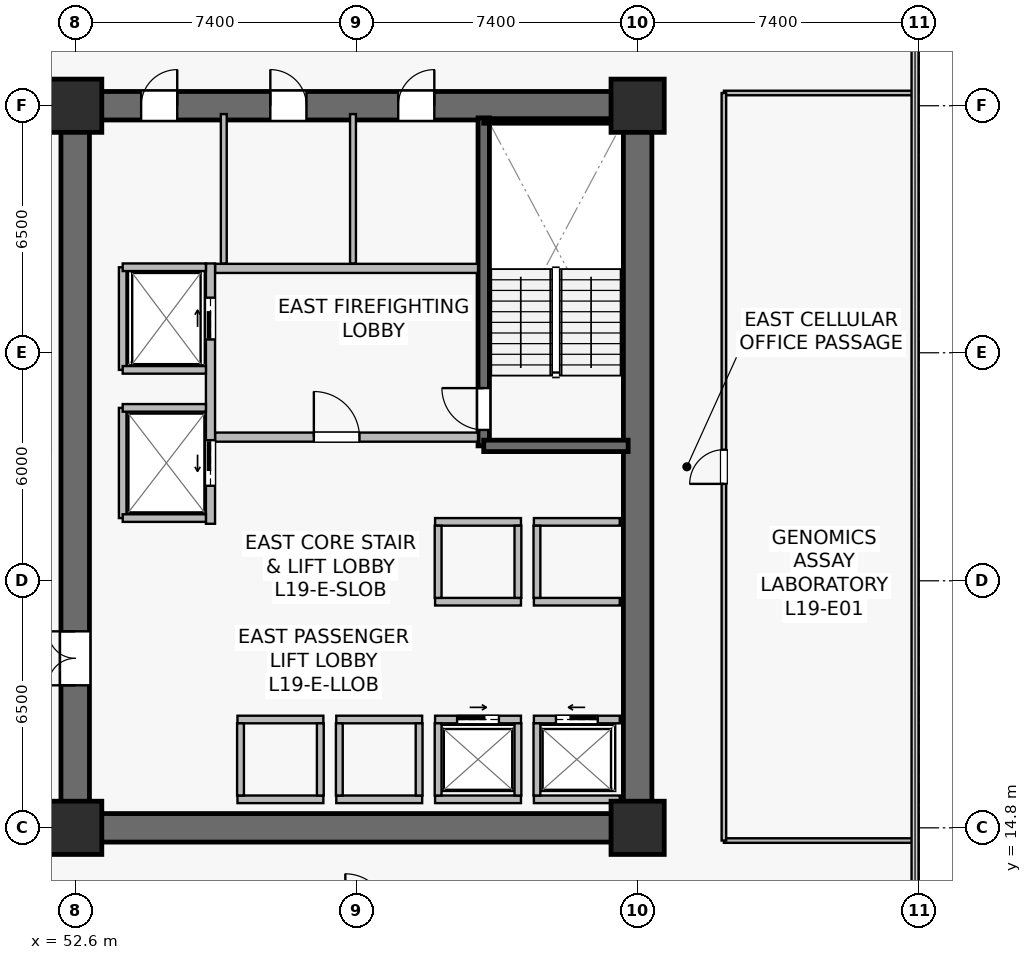
"""IFC4 building model, lengths in metres.
Left out: names, types, materials, properties, quantities, classifications, styles, units other than length and angle.
Written with IfcOpenShell. Run it as: python <this file> out.ifc"""

import sys

from ifc_helpers import new_model, si_unit, direction, frame, frame_2d, origin, origin_2d, place, context, subcontext, project, spatial, rectangle, extrude, source, transform, mapped, element, fill, save


model = new_model("IFC4")
c1 = context("Model", 3, precision=1e-05, world=origin(), true_north=direction((0.0, 1.0)))
c2 = subcontext(c1, "Body", "Model", "MODEL_VIEW")
j1 = project(units=[si_unit("LENGTHUNIT", "METRE"), si_unit("PLANEANGLEUNIT", "RADIAN")], contexts=[c1])
p1 = place(None, origin())
s1 = spatial("IfcSite", under=j1, at=p1, CompositionType="ELEMENT")
p2 = place(p1, origin())
s2 = spatial("IfcBuilding", under=s1, at=p2, CompositionType="ELEMENT")
p3 = place(p2, frame((0.0, 0.0, 78.5)))
s3 = spatial("IfcBuildingStorey", under=s2, at=p3, CompositionType="ELEMENT", Elevation=78.5)
p4 = place(p3, frame((52.225, 14.8, 0.0), z_axis=(0.0, 0.0, 1.0), x_axis=(1.0, 0.0, 0.0)))
e1 = element("IfcWall", 1, at=p4, inside=s3, PredefinedType="SHEAR", context=c2, shape_type="SweptSolid", body=[
    extrude(rectangle(XDim=15.55, YDim=0.75, at=frame_2d((7.775, 0.0))), origin(), (0.0, 0.0, 1.0), 3.78),
])
p5 = place(p3, frame((52.225, 33.8, 0.0), z_axis=(0.0, 0.0, 1.0), x_axis=(1.0, 0.0, 0.0)))
e2 = element("IfcWall", 2, at=p5, inside=s3, PredefinedType="SHEAR", context=c2, shape_type="SweptSolid", body=[
    extrude(rectangle(XDim=15.55, YDim=0.75, at=frame_2d((7.775, 0.0))), origin(), (0.0, 0.0, 1.0), 3.78),
])
p6 = place(p5, frame((8.875, 0.0, 0.0)))
e3 = element("IfcOpeningElement", 3, at=p6, cuts=e2, PredefinedType="OPENING", context=c2, shape_type="SweptSolid", body=[
    extrude(rectangle(XDim=0.95, YDim=2.15, at=frame_2d((0.475, 1.075))), frame((0.0, 0.385, 0.0), z_axis=(0.0, -1.0, 0.0), x_axis=(1.0, 0.0, 0.0)), (0.0, 0.0, 1.0), 0.77),
])
p7 = place(p5, frame((5.51, 0.0, 0.0)))
e4 = element("IfcOpeningElement", 4, at=p7, cuts=e2, PredefinedType="OPENING", context=c2, shape_type="SweptSolid", body=[
    extrude(rectangle(XDim=0.95, YDim=2.15, at=frame_2d((0.475, 1.075))), frame((0.0, 0.385, 0.0), z_axis=(0.0, -1.0, 0.0), x_axis=(1.0, 0.0, 0.0)), (0.0, 0.0, 1.0), 0.77),
])
p8 = place(p5, frame((2.11, 0.0, 0.0)))
e5 = element("IfcOpeningElement", 5, at=p8, cuts=e2, PredefinedType="OPENING", context=c2, shape_type="SweptSolid", body=[
    extrude(rectangle(XDim=0.95, YDim=2.15, at=frame_2d((0.475, 1.075))), frame((0.0, 0.385, 0.0), z_axis=(0.0, -1.0, 0.0), x_axis=(1.0, 0.0, 0.0)), (0.0, 0.0, 1.0), 0.77),
])
p9 = place(p3, frame((52.6, 15.175, 0.0), z_axis=(0.0, 0.0, 1.0), x_axis=(0.0, 1.0, 0.0)))
e6 = element("IfcWall", 6, at=p9, inside=s3, PredefinedType="SHEAR", context=c2, shape_type="SweptSolid", body=[
    extrude(rectangle(XDim=18.25, YDim=0.75, at=frame_2d((9.125, 0.0))), origin(), (0.0, 0.0, 1.0), 3.78),
])
p10 = place(p9, frame((3.375, 0.0, 0.0)))
e7 = element("IfcOpeningElement", 7, at=p10, cuts=e6, PredefinedType="OPENING", context=c2, shape_type="SweptSolid", body=[
    extrude(rectangle(XDim=1.42, YDim=2.2, at=frame_2d((0.71, 1.1))), frame((0.0, 0.385, 0.0), z_axis=(0.0, -1.0, 0.0), x_axis=(1.0, 0.0, 0.0)), (0.0, 0.0, 1.0), 0.77),
])
p11 = place(p3, frame((67.4, 15.175, 0.0), z_axis=(0.0, 0.0, 1.0), x_axis=(0.0, 1.0, 0.0)))
e8 = element("IfcWall", 8, at=p11, inside=s3, PredefinedType="SHEAR", context=c2, shape_type="SweptSolid", body=[
    extrude(rectangle(XDim=18.25, YDim=0.75, at=frame_2d((9.125, 0.0))), origin(), (0.0, 0.0, 1.0), 3.78),
])
p12 = place(p3, frame((63.35, 24.85, 0.0), z_axis=(0.0, 0.0, 1.0), x_axis=(0.0, 1.0, 0.0)))
e9 = element("IfcWall", 9, at=p12, inside=s3, PredefinedType="SHEAR", context=c2, shape_type="SweptSolid", body=[
    extrude(rectangle(XDim=8.63, YDim=0.3, at=frame_2d((4.315, 0.0))), origin(), (0.0, 0.0, 1.0), 3.78),
])
p13 = place(p12, frame((0.42, 0.0, 0.0)))
e10 = element("IfcOpeningElement", 10, at=p13, cuts=e9, PredefinedType="OPENING", context=c2, shape_type="SweptSolid", body=[
    extrude(rectangle(XDim=1.1, YDim=2.15, at=frame_2d((0.55, 1.075))), frame((0.0, 0.16, 0.0), z_axis=(0.0, -1.0, 0.0), x_axis=(1.0, 0.0, 0.0)), (0.0, 0.0, 1.0), 0.32),
])
p14 = place(p3, frame((63.35, 24.85, 0.0), z_axis=(0.0, 0.0, 1.0), x_axis=(1.0, 0.0, 0.0)))
e11 = element("IfcWall", 11, at=p14, inside=s3, PredefinedType="SHEAR", context=c2, shape_type="SweptSolid", body=[
    extrude(rectangle(XDim=3.8, YDim=0.3, at=frame_2d((1.9, 0.0))), origin(), (0.0, 0.0, 1.0), 3.78),
])
p15 = place(p3, frame((63.35, 33.4, 0.0), z_axis=(0.0, 0.0, 1.0), x_axis=(1.0, 0.0, 0.0)))
e12 = element("IfcWall", 12, at=p15, inside=s3, PredefinedType="SOLIDWALL", context=c2, shape_type="SweptSolid", body=[
    extrude(rectangle(XDim=3.72, YDim=0.12, at=frame_2d((1.86, 0.0))), origin(), (0.0, 0.0, 1.0), 3.78),
])
m1 = source(origin(), c2, "Body", "SweptSolid", [
    extrude(rectangle(XDim=1.4, YDim=1.4, at=origin_2d()), origin(), (0.0, 0.0, 1.0), 4.1),
])
for number, where, z_axis, x_axis in (
    (13, (52.6, 14.8, 0.0), (0.0, 0.0, 1.0), (1.0, 0.0, 0.0)),
    (14, (67.4, 14.8, 0.0), (0.0, 0.0, 1.0), (1.0, 0.0, 0.0)),
    (15, (52.6, 33.8, 0.0), (0.0, 0.0, 1.0), (1.0, 0.0, 0.0)),
    (16, (67.4, 33.8, 0.0), (0.0, 0.0, 1.0), (1.0, 0.0, 0.0)),
):
    element("IfcColumn", number, at=place(p3, frame(where, z_axis=z_axis, x_axis=x_axis)), inside=s3, PredefinedType="COLUMN", context=c2, shape_type="MappedRepresentation", body=[
        mapped(m1, transform((0.0, 0.0, 0.0), scale=1.0)),
    ])
p16 = place(p3, frame((56.28, 25.08, 0.0), z_axis=(0.0, 0.0, 1.0), x_axis=(1.0, 0.0, 0.0)))
e17 = element("IfcWall", 17, at=p16, inside=s3, PredefinedType="SOLIDWALL", context=c2, shape_type="SweptSolid", body=[
    extrude(rectangle(XDim=6.92, YDim=0.24, at=frame_2d((3.46, 0.0))), origin(), (0.0, 0.0, 1.0), 3.115),
])
p17 = place(p16, frame((2.6, 0.0, 0.0)))
e18 = element("IfcOpeningElement", 18, at=p17, cuts=e17, PredefinedType="OPENING", context=c2, shape_type="SweptSolid", body=[
    extrude(rectangle(XDim=1.2, YDim=2.16, at=frame_2d((0.6, 1.08))), frame((0.0, 0.13, 0.0), z_axis=(0.0, -1.0, 0.0), x_axis=(1.0, 0.0, 0.0)), (0.0, 0.0, 1.0), 0.26),
])
p18 = place(p3, frame((56.28, 29.52, 0.0), z_axis=(0.0, 0.0, 1.0), x_axis=(1.0, 0.0, 0.0)))
e19 = element("IfcWall", 19, at=p18, inside=s3, PredefinedType="SOLIDWALL", context=c2, shape_type="SweptSolid", body=[
    extrude(rectangle(XDim=6.92, YDim=0.24, at=frame_2d((3.46, 0.0))), origin(), (0.0, 0.0, 1.0), 3.115),
])
p19 = place(p3, frame((56.16, 22.8, 0.0), z_axis=(0.0, 0.0, 1.0), x_axis=(0.0, 1.0, 0.0)))
e20 = element("IfcWall", 20, at=p19, inside=s3, PredefinedType="SOLIDWALL", context=c2, shape_type="SweptSolid", body=[
    extrude(rectangle(XDim=6.85, YDim=0.24, at=frame_2d((3.425, 0.0))), origin(), (0.0, 0.0, 1.0), 2.865),
])
p20 = place(p19, frame((4.85, 0.0, 0.0)))
e21 = element("IfcOpeningElement", 21, at=p20, cuts=e20, PredefinedType="OPENING", context=c2, shape_type="SweptSolid", body=[
    extrude(rectangle(XDim=1.1, YDim=2.22, at=frame_2d((0.55, 1.11))), frame((0.0, 0.13, 0.0), z_axis=(0.0, -1.0, 0.0), x_axis=(1.0, 0.0, 0.0)), (0.0, 0.0, 1.0), 0.26),
])
p21 = place(p19, frame((1.0, 0.0, 0.0)))
e22 = element("IfcOpeningElement", 22, at=p21, cuts=e20, PredefinedType="OPENING", context=c2, shape_type="SweptSolid", body=[
    extrude(rectangle(XDim=1.2, YDim=2.22, at=frame_2d((0.6, 1.11))), frame((0.0, 0.13, 0.0), z_axis=(0.0, -1.0, 0.0), x_axis=(1.0, 0.0, 0.0)), (0.0, 0.0, 1.0), 0.26),
])
p22 = place(p3, frame((64.67, 17.65, 0.0), z_axis=(0.0, 0.0, 1.0), x_axis=(1.0, 0.0, 0.0)))
e23 = element("IfcWall", 23, at=p22, inside=s3, PredefinedType="SOLIDWALL", context=c2, shape_type="SweptSolid", body=[
    extrude(rectangle(XDim=2.26, YDim=0.2, at=frame_2d((1.13, 0.0))), origin(), (0.0, 0.0, 1.0), 3.78),
])
p23 = place(p22, frame((0.58, 0.0, 0.0)))
e24 = element("IfcOpeningElement", 24, at=p23, cuts=e23, PredefinedType="OPENING", context=c2, shape_type="SweptSolid", body=[
    extrude(rectangle(XDim=1.1, YDim=2.22, at=frame_2d((0.55, 1.11))), frame((0.0, 0.11, 0.0), z_axis=(0.0, -1.0, 0.0), x_axis=(1.0, 0.0, 0.0)), (0.0, 0.0, 1.0), 0.22),
])
p24 = place(p3, frame((64.67, 15.55, 0.0), z_axis=(0.0, 0.0, 1.0), x_axis=(1.0, 0.0, 0.0)))
e25 = element("IfcWall", 25, at=p24, inside=s3, PredefinedType="SOLIDWALL", context=c2, shape_type="SweptSolid", body=[
    extrude(rectangle(XDim=2.26, YDim=0.2, at=frame_2d((1.13, 0.0))), origin(), (0.0, 0.0, 1.0), 3.78),
])
p25 = place(p3, frame((64.75, 15.65, 0.0), z_axis=(0.0, 0.0, 1.0), x_axis=(0.0, 1.0, 0.0)))
e26 = element("IfcWall", 26, at=p25, inside=s3, PredefinedType="SOLIDWALL", context=c2, shape_type="SweptSolid", body=[
    extrude(rectangle(XDim=1.9, YDim=0.18, at=frame_2d((0.95, 0.0))), origin(), (0.0, 0.0, 1.0), 3.78),
])
p26 = place(p3, frame((62.07, 17.65, 0.0), z_axis=(0.0, 0.0, 1.0), x_axis=(1.0, 0.0, 0.0)))
e27 = element("IfcWall", 27, at=p26, inside=s3, PredefinedType="SOLIDWALL", context=c2, shape_type="SweptSolid", body=[
    extrude(rectangle(XDim=2.26, YDim=0.2, at=frame_2d((1.13, 0.0))), origin(), (0.0, 0.0, 1.0), 3.78),
])
p27 = place(p26, frame((0.58, 0.0, 0.0)))
e28 = element("IfcOpeningElement", 28, at=p27, cuts=e27, PredefinedType="OPENING", context=c2, shape_type="SweptSolid", body=[
    extrude(rectangle(XDim=1.1, YDim=2.22, at=frame_2d((0.55, 1.11))), frame((0.0, 0.11, 0.0), z_axis=(0.0, -1.0, 0.0), x_axis=(1.0, 0.0, 0.0)), (0.0, 0.0, 1.0), 0.22),
])
p28 = place(p3, frame((62.07, 15.55, 0.0), z_axis=(0.0, 0.0, 1.0), x_axis=(1.0, 0.0, 0.0)))
e29 = element("IfcWall", 29, at=p28, inside=s3, PredefinedType="SOLIDWALL", context=c2, shape_type="SweptSolid", body=[
    extrude(rectangle(XDim=2.26, YDim=0.2, at=frame_2d((1.13, 0.0))), origin(), (0.0, 0.0, 1.0), 3.78),
])
for number, where, z_axis, x_axis in (
    (30, (62.15, 15.65, 0.0), (0.0, 0.0, 1.0), (0.0, 1.0, 0.0)),
    (31, (64.25, 15.65, 0.0), (0.0, 0.0, 1.0), (0.0, 1.0, 0.0)),
):
    element("IfcWall", number, at=place(p3, frame(where, z_axis=z_axis, x_axis=x_axis)), inside=s3, PredefinedType="SOLIDWALL", context=c2, shape_type="SweptSolid", body=[
        extrude(rectangle(XDim=1.9, YDim=0.18, at=frame_2d((0.95, 0.0))), origin(), (0.0, 0.0, 1.0), 3.78),
    ])
for number, where, z_axis, x_axis in (
    (32, (59.47, 17.65, 0.0), (0.0, 0.0, 1.0), (1.0, 0.0, 0.0)),
    (33, (59.47, 15.55, 0.0), (0.0, 0.0, 1.0), (1.0, 0.0, 0.0)),
):
    element("IfcWall", number, at=place(p3, frame(where, z_axis=z_axis, x_axis=x_axis)), inside=s3, PredefinedType="SOLIDWALL", context=c2, shape_type="SweptSolid", body=[
        extrude(rectangle(XDim=2.26, YDim=0.2, at=frame_2d((1.13, 0.0))), origin(), (0.0, 0.0, 1.0), 3.115),
    ])
for number, where, z_axis, x_axis in (
    (34, (59.55, 15.65, 0.0), (0.0, 0.0, 1.0), (0.0, 1.0, 0.0)),
    (35, (61.65, 15.65, 0.0), (0.0, 0.0, 1.0), (0.0, 1.0, 0.0)),
):
    element("IfcWall", number, at=place(p3, frame(where, z_axis=z_axis, x_axis=x_axis)), inside=s3, PredefinedType="SOLIDWALL", context=c2, shape_type="SweptSolid", body=[
        extrude(rectangle(XDim=1.9, YDim=0.18, at=frame_2d((0.95, 0.0))), origin(), (0.0, 0.0, 1.0), 3.78),
    ])
for number, where, z_axis, x_axis in (
    (36, (56.87, 17.65, 0.0), (0.0, 0.0, 1.0), (1.0, 0.0, 0.0)),
    (37, (56.87, 15.55, 0.0), (0.0, 0.0, 1.0), (1.0, 0.0, 0.0)),
):
    element("IfcWall", number, at=place(p3, frame(where, z_axis=z_axis, x_axis=x_axis)), inside=s3, PredefinedType="SOLIDWALL", context=c2, shape_type="SweptSolid", body=[
        extrude(rectangle(XDim=2.26, YDim=0.2, at=frame_2d((1.13, 0.0))), origin(), (0.0, 0.0, 1.0), 3.78),
    ])
for number, where, z_axis, x_axis in (
    (38, (56.95, 15.65, 0.0), (0.0, 0.0, 1.0), (0.0, 1.0, 0.0)),
    (39, (59.05, 15.65, 0.0), (0.0, 0.0, 1.0), (0.0, 1.0, 0.0)),
):
    element("IfcWall", number, at=place(p3, frame(where, z_axis=z_axis, x_axis=x_axis)), inside=s3, PredefinedType="SOLIDWALL", context=c2, shape_type="SweptSolid", body=[
        extrude(rectangle(XDim=1.9, YDim=0.18, at=frame_2d((0.95, 0.0))), origin(), (0.0, 0.0, 1.0), 3.78),
    ])
for number, where, z_axis, x_axis in (
    (40, (64.67, 20.75, 0.0), (0.0, 0.0, 1.0), (1.0, 0.0, 0.0)),
    (41, (64.67, 22.85, 0.0), (0.0, 0.0, 1.0), (1.0, 0.0, 0.0)),
):
    element("IfcWall", number, at=place(p3, frame(where, z_axis=z_axis, x_axis=x_axis)), inside=s3, PredefinedType="SOLIDWALL", context=c2, shape_type="SweptSolid", body=[
        extrude(rectangle(XDim=2.26, YDim=0.2, at=frame_2d((1.13, 0.0))), origin(), (0.0, 0.0, 1.0), 3.78),
    ])
p29 = place(p3, frame((64.75, 20.85, 0.0), z_axis=(0.0, 0.0, 1.0), x_axis=(0.0, 1.0, 0.0)))
e42 = element("IfcWall", 42, at=p29, inside=s3, PredefinedType="SOLIDWALL", context=c2, shape_type="SweptSolid", body=[
    extrude(rectangle(XDim=1.9, YDim=0.18, at=frame_2d((0.95, 0.0))), origin(), (0.0, 0.0, 1.0), 3.78),
])
for number, where, z_axis, x_axis in (
    (43, (62.07, 20.75, 0.0), (0.0, 0.0, 1.0), (1.0, 0.0, 0.0)),
    (44, (62.07, 22.85, 0.0), (0.0, 0.0, 1.0), (1.0, 0.0, 0.0)),
):
    element("IfcWall", number, at=place(p3, frame(where, z_axis=z_axis, x_axis=x_axis)), inside=s3, PredefinedType="SOLIDWALL", context=c2, shape_type="SweptSolid", body=[
        extrude(rectangle(XDim=2.26, YDim=0.2, at=frame_2d((1.13, 0.0))), origin(), (0.0, 0.0, 1.0), 3.78),
    ])
for number, where, z_axis, x_axis in (
    (45, (62.15, 20.85, 0.0), (0.0, 0.0, 1.0), (0.0, 1.0, 0.0)),
    (46, (64.25, 20.85, 0.0), (0.0, 0.0, 1.0), (0.0, 1.0, 0.0)),
):
    element("IfcWall", number, at=place(p3, frame(where, z_axis=z_axis, x_axis=x_axis)), inside=s3, PredefinedType="SOLIDWALL", context=c2, shape_type="SweptSolid", body=[
        extrude(rectangle(XDim=1.9, YDim=0.18, at=frame_2d((0.95, 0.0))), origin(), (0.0, 0.0, 1.0), 3.78),
    ])
p30 = place(p3, frame((53.85, 26.85, 0.0), z_axis=(0.0, 0.0, 1.0), x_axis=(0.0, 1.0, 0.0)))
e47 = element("IfcWall", 47, at=p30, inside=s3, PredefinedType="SOLIDWALL", context=c2, shape_type="SweptSolid", body=[
    extrude(rectangle(XDim=2.7, YDim=0.2, at=frame_2d((1.35, 0.0))), origin(), (0.0, 0.0, 1.0), 3.78),
])
p31 = place(p3, frame((53.85, 29.55, 0.0), z_axis=(0.0, 0.0, 1.0), x_axis=(1.0, 0.0, 0.0)))
e48 = element("IfcWall", 48, at=p31, inside=s3, PredefinedType="SOLIDWALL", context=c2, shape_type="SweptSolid", body=[
    extrude(rectangle(XDim=2.19, YDim=0.2, at=frame_2d((1.095, 0.0))), origin(), (0.0, 0.0, 1.0), 3.78),
])
p32 = place(p3, frame((53.85, 26.85, 0.0), z_axis=(0.0, 0.0, 1.0), x_axis=(1.0, 0.0, 0.0)))
e49 = element("IfcWall", 49, at=p32, inside=s3, PredefinedType="SOLIDWALL", context=c2, shape_type="SweptSolid", body=[
    extrude(rectangle(XDim=2.19, YDim=0.2, at=frame_2d((1.095, 0.0))), origin(), (0.0, 0.0, 1.0), 3.177),
])
p33 = place(p3, frame((53.85, 22.95, 0.0), z_axis=(0.0, 0.0, 1.0), x_axis=(0.0, 1.0, 0.0)))
e50 = element("IfcWall", 50, at=p33, inside=s3, PredefinedType="SOLIDWALL", context=c2, shape_type="SweptSolid", body=[
    extrude(rectangle(XDim=2.9, YDim=0.2, at=frame_2d((1.45, 0.0))), origin(), (0.0, 0.0, 1.0), 2.865),
])
for number, where, z_axis, x_axis in (
    (51, (53.85, 25.85, 0.0), (0.0, 0.0, 1.0), (1.0, 0.0, 0.0)),
    (52, (53.85, 22.95, 0.0), (0.0, 0.0, 1.0), (1.0, 0.0, 0.0)),
):
    element("IfcWall", number, at=place(p3, frame(where, z_axis=z_axis, x_axis=x_axis)), inside=s3, PredefinedType="SOLIDWALL", context=c2, shape_type="SweptSolid", body=[
        extrude(rectangle(XDim=2.19, YDim=0.2, at=frame_2d((1.095, 0.0))), origin(), (0.0, 0.0, 1.0), 3.78),
    ])
p34 = place(p3, frame((59.91, 29.65, 0.0), z_axis=(0.0, 0.0, 1.0), x_axis=(0.0, 1.0, 0.0)))
e53 = element("IfcWall", 53, at=p34, inside=s3, PredefinedType="PLUMBINGWALL", context=c2, shape_type="SweptSolid", body=[
    extrude(rectangle(XDim=3.93, YDim=0.155, at=frame_2d((1.965, 0.0))), origin(), (0.0, 0.0, 1.0), 3.115),
])
p35 = place(p3, frame((56.51, 29.65, 0.0), z_axis=(0.0, 0.0, 1.0), x_axis=(0.0, 1.0, 0.0)))
e54 = element("IfcWall", 54, at=p35, inside=s3, PredefinedType="PLUMBINGWALL", context=c2, shape_type="SweptSolid", body=[
    extrude(rectangle(XDim=3.93, YDim=0.155, at=frame_2d((1.965, 0.0))), origin(), (0.0, 0.0, 1.0), 3.78),
])
for number, where, z_axis, x_axis in (
    (55, (69.67, 14.465, 0.0), (0.0, 0.0, 1.0), (1.0, 0.0, 0.0)),
    (56, (69.67, 34.135, 0.0), (0.0, 0.0, 1.0), (1.0, 0.0, 0.0)),
):
    element("IfcWall", number, at=place(p3, frame(where, z_axis=z_axis, x_axis=x_axis)), inside=s3, PredefinedType="PARTITIONING", context=c2, shape_type="SweptSolid", body=[
        extrude(rectangle(XDim=5.02, YDim=0.12, at=frame_2d((2.51, 0.0))), origin(), (0.0, 0.0, 1.0), 3.78),
    ])
p36 = place(p3, frame((69.67, 14.465, 0.0), z_axis=(0.0, 0.0, 1.0), x_axis=(0.0, 1.0, 0.0)))
e57 = element("IfcWall", 57, at=p36, inside=s3, PredefinedType="PARTITIONING", context=c2, shape_type="SweptSolid", body=[
    extrude(rectangle(XDim=19.67, YDim=0.12, at=frame_2d((9.835, 0.0))), origin(), (0.0, 0.0, 1.0), 3.78),
])
p37 = place(p36, frame((9.385, 0.0, 0.0)))
e58 = element("IfcOpeningElement", 58, at=p37, cuts=e57, PredefinedType="OPENING", context=c2, shape_type="SweptSolid", body=[
    extrude(rectangle(XDim=0.9, YDim=2.1, at=frame_2d((0.45, 1.05))), frame((0.0, 0.07, 0.0), z_axis=(0.0, -1.0, 0.0), x_axis=(1.0, 0.0, 0.0)), (0.0, 0.0, 1.0), 0.14),
])
m2 = source(origin(), c2, "Body", "SweptSolid", [
    extrude(rectangle(XDim=1.1, YDim=2.15, at=frame_2d((0.55, 1.075))), frame((0.0, 0.025, 0.0), z_axis=(0.0, -1.0, 0.0), x_axis=(1.0, 0.0, 0.0)), (0.0, 0.0, 1.0), 0.05),
])
p38 = place(p13, origin())
e59 = element("IfcDoor", 59, at=p38, inside=s3, OperationType="SINGLE_SWING_RIGHT", PredefinedType="DOOR", context=c2, shape_type="MappedRepresentation", body=[
    mapped(m2, transform((0.0, 0.0, 0.0), scale=1.0)),
])
fill(e10, e59)
m3 = source(origin(), c2, "Body", "SweptSolid", [
    extrude(rectangle(XDim=1.2, YDim=2.16, at=frame_2d((0.6, 1.08))), frame((0.0, 0.025, 0.0), z_axis=(0.0, -1.0, 0.0), x_axis=(1.0, 0.0, 0.0)), (0.0, 0.0, 1.0), 0.05),
])
p39 = place(p17, origin())
e60 = element("IfcDoor", 60, at=p39, inside=s3, OperationType="SINGLE_SWING_LEFT", PredefinedType="DOOR", context=c2, shape_type="MappedRepresentation", body=[
    mapped(m3, transform((0.0, 0.0, 0.0), scale=1.0)),
])
fill(e18, e60)
m4 = source(origin(), c2, "Body", "SweptSolid", [
    extrude(rectangle(XDim=1.1, YDim=2.22, at=frame_2d((0.55, 1.11))), frame((0.0, 0.025, 0.0), z_axis=(0.0, -1.0, 0.0), x_axis=(1.0, 0.0, 0.0)), (0.0, 0.0, 1.0), 0.05),
])
p40 = place(p23, origin())
e61 = element("IfcDoor", 61, at=p40, inside=s3, OperationType="SLIDING_TO_LEFT", PredefinedType="USERDEFINED", context=c2, shape_type="MappedRepresentation", body=[
    mapped(m4, transform((0.0, 0.0, 0.0), scale=1.0)),
])
fill(e24, e61)
p41 = place(p27, origin())
e62 = element("IfcDoor", 62, at=p41, inside=s3, OperationType="SLIDING_TO_RIGHT", PredefinedType="USERDEFINED", context=c2, shape_type="MappedRepresentation", body=[
    mapped(m4, transform((0.0, 0.0, 0.0), scale=1.0)),
])
fill(e28, e62)
p42 = place(p20, origin())
e63 = element("IfcDoor", 63, at=p42, inside=s3, OperationType="SLIDING_TO_RIGHT", PredefinedType="USERDEFINED", context=c2, shape_type="MappedRepresentation", body=[
    mapped(m4, transform((0.0, 0.0, 0.0), scale=1.0)),
])
fill(e21, e63)
m5 = source(origin(), c2, "Body", "SweptSolid", [
    extrude(rectangle(XDim=1.2, YDim=2.22, at=frame_2d((0.6, 1.11))), frame((0.0, 0.025, 0.0), z_axis=(0.0, -1.0, 0.0), x_axis=(1.0, 0.0, 0.0)), (0.0, 0.0, 1.0), 0.05),
])
p43 = place(p21, origin())
e64 = element("IfcDoor", 64, at=p43, inside=s3, OperationType="SLIDING_TO_LEFT", PredefinedType="USERDEFINED", context=c2, shape_type="MappedRepresentation", body=[
    mapped(m5, transform((0.0, 0.0, 0.0), scale=1.0)),
])
fill(e22, e64)
m6 = source(origin(), c2, "Body", "SweptSolid", [
    extrude(rectangle(XDim=1.42, YDim=2.2, at=frame_2d((0.71, 1.1))), frame((0.0, 0.025, 0.0), z_axis=(0.0, -1.0, 0.0), x_axis=(1.0, 0.0, 0.0)), (0.0, 0.0, 1.0), 0.05),
])
p44 = place(p10, origin())
e65 = element("IfcDoor", 65, at=p44, inside=s3, OperationType="DOUBLE_DOOR_SINGLE_SWING", PredefinedType="DOOR", context=c2, shape_type="MappedRepresentation", body=[
    mapped(m6, transform((0.0, 0.0, 0.0), scale=1.0)),
])
fill(e7, e65)
m7 = source(origin(), c2, "Body", "SweptSolid", [
    extrude(rectangle(XDim=0.95, YDim=2.15, at=frame_2d((0.475, 1.075))), frame((0.0, 0.025, 0.0), z_axis=(0.0, -1.0, 0.0), x_axis=(1.0, 0.0, 0.0)), (0.0, 0.0, 1.0), 0.05),
])
p45 = place(p6, origin())
e66 = element("IfcDoor", 66, at=p45, inside=s3, OperationType="SINGLE_SWING_RIGHT", PredefinedType="DOOR", context=c2, shape_type="MappedRepresentation", body=[
    mapped(m7, transform((0.0, 0.0, 0.0), scale=1.0)),
])
fill(e3, e66)
p46 = place(p7, origin())
e67 = element("IfcDoor", 67, at=p46, inside=s3, OperationType="SINGLE_SWING_LEFT", PredefinedType="DOOR", context=c2, shape_type="MappedRepresentation", body=[
    mapped(m7, transform((0.0, 0.0, 0.0), scale=1.0)),
])
fill(e4, e67)
p47 = place(p8, origin())
e68 = element("IfcDoor", 68, at=p47, inside=s3, OperationType="SINGLE_SWING_RIGHT", PredefinedType="DOOR", context=c2, shape_type="MappedRepresentation", body=[
    mapped(m7, transform((0.0, 0.0, 0.0), scale=1.0)),
])
fill(e5, e68)
m8 = source(origin(), c2, "Body", "SweptSolid", [
    extrude(rectangle(XDim=0.9, YDim=2.1, at=frame_2d((0.45, 1.05))), frame((0.0, 0.025, 0.0), z_axis=(0.0, -1.0, 0.0), x_axis=(1.0, 0.0, 0.0)), (0.0, 0.0, 1.0), 0.05),
])
p48 = place(p37, origin())
e69 = element("IfcDoor", 69, at=p48, inside=s3, OperationType="SINGLE_SWING_LEFT", PredefinedType="DOOR", context=c2, shape_type="MappedRepresentation", body=[
    mapped(m8, transform((0.0, 0.0, 0.0), scale=1.0)),
])
fill(e58, e69)
save(model, sys.argv[1])
